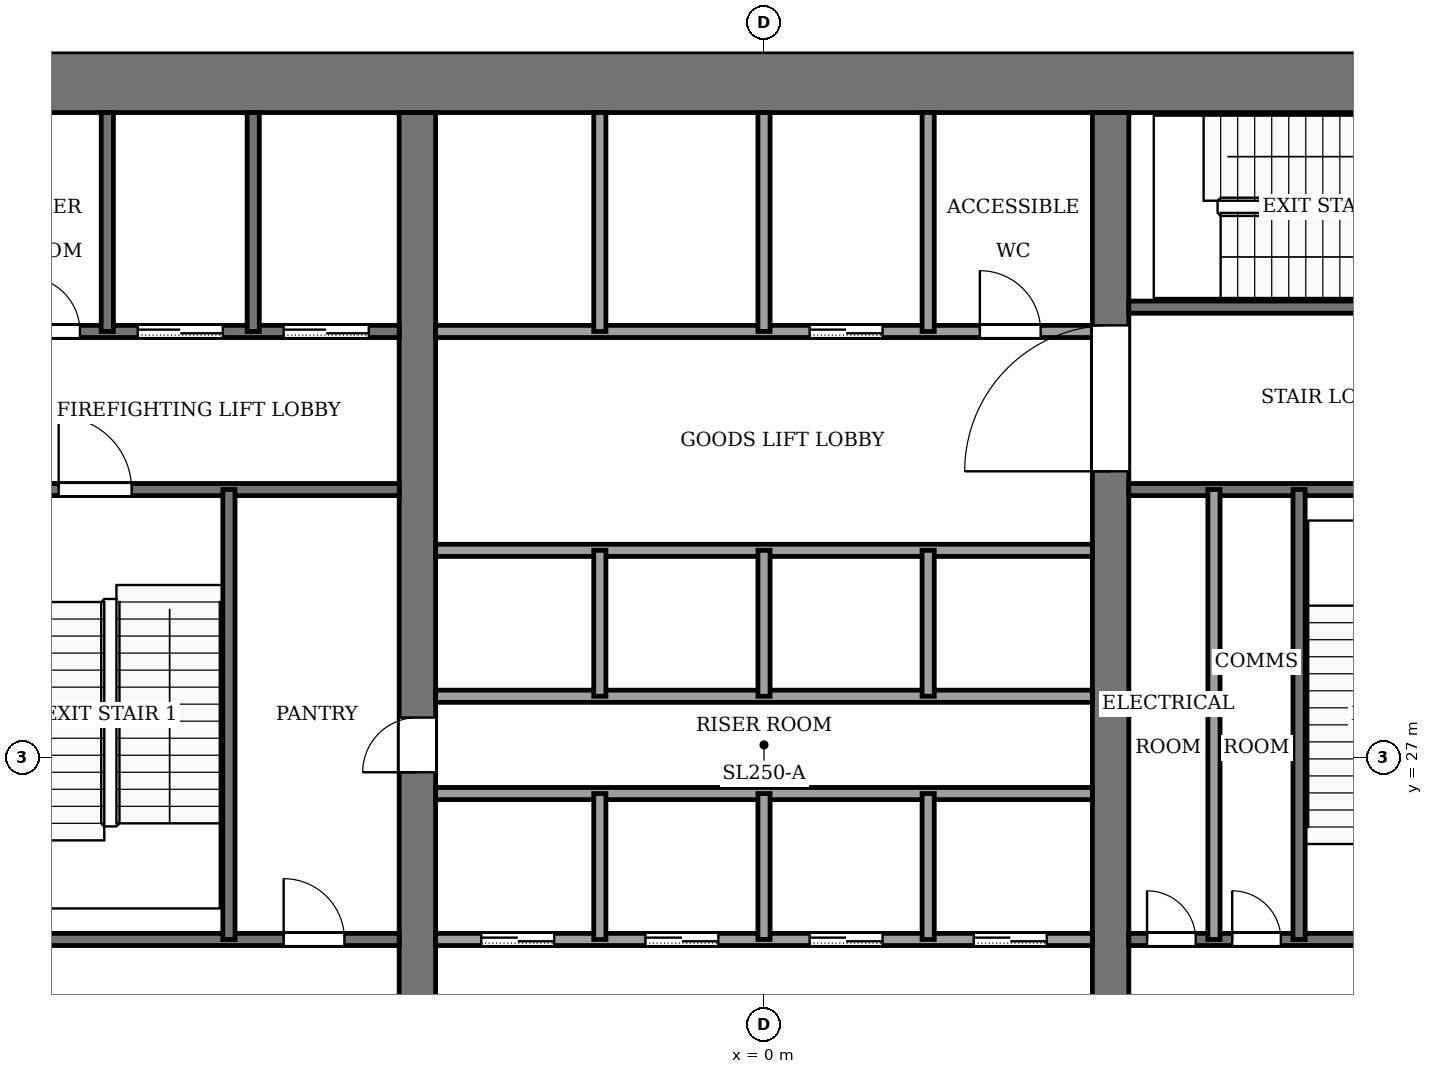
"""IFC4 building model, lengths in metres.
Left out: names, types, materials, properties, quantities, classifications, styles, units other than length and angle.
Written with IfcOpenShell. Run it as: python <this file> out.ifc"""

import sys

from ifc_helpers import new_model, si_unit, direction, frame, frame_2d, origin, place, context, subcontext, project, spatial, rectangle, extrude, element, fill, save


model = new_model("IFC4")
c1 = context("Model", 3, precision=1e-05, world=origin(), true_north=direction((0.0, 1.0)))
c2 = subcontext(c1, "Body", "Model", "MODEL_VIEW")
j1 = project(units=[si_unit("LENGTHUNIT", "METRE"), si_unit("PLANEANGLEUNIT", "RADIAN")], contexts=[c1])
p1 = place(None, origin())
s1 = spatial("IfcSite", under=j1, at=p1, CompositionType="ELEMENT")
p2 = place(p1, origin())
s2 = spatial("IfcBuilding", under=s1, at=p2, CompositionType="ELEMENT")
p3 = place(p2, frame((0.0, 0.0, 121.0)))
s3 = spatial("IfcBuildingStorey", under=s2, at=p3, CompositionType="ELEMENT", Elevation=121.0)
p4 = place(p3, frame((-13.6, 38.1, -0.13), z_axis=(0.0, 0.0, 1.0), x_axis=(1.0, 0.0, 0.0)))
e1 = element("IfcWall", 1, at=p4, inside=s3, PredefinedType="SHEAR", context=c2, shape_type="SweptSolid", body=[
    extrude(rectangle(XDim=27.2, YDim=1.0, at=frame_2d((13.6, 0.0))), origin(), (0.0, 0.0, 1.0), 5.0),
])
p5 = place(p3, frame((-5.7, 18.4, -0.13), z_axis=(0.0, 0.0, 1.0), x_axis=(0.0, 1.0, 0.0)))
e2 = element("IfcWall", 2, at=p5, inside=s3, PredefinedType="SHEAR", context=c2, shape_type="SweptSolid", body=[
    extrude(rectangle(XDim=19.2, YDim=0.6, at=frame_2d((9.6, 0.0))), origin(), (0.0, 0.0, 1.0), 5.0),
])
p6 = place(p5, frame((8.35, 0.0, 0.13)))
e3 = element("IfcOpeningElement", 3, at=p6, cuts=e2, PredefinedType="OPENING", context=c2, shape_type="SweptSolid", body=[
    extrude(rectangle(XDim=0.9, YDim=2.1, at=frame_2d((0.45, 1.05))), frame((0.0, 0.31, 0.0), z_axis=(0.0, -1.0, 0.0), x_axis=(1.0, 0.0, 0.0)), (0.0, 0.0, 1.0), 0.62),
])
p7 = place(p3, frame((5.7, 18.4, -0.13), z_axis=(0.0, 0.0, 1.0), x_axis=(0.0, 1.0, 0.0)))
e4 = element("IfcWall", 4, at=p7, inside=s3, PredefinedType="SHEAR", context=c2, shape_type="SweptSolid", body=[
    extrude(rectangle(XDim=19.2, YDim=0.6, at=frame_2d((9.6, 0.0))), origin(), (0.0, 0.0, 1.0), 5.0),
])
p8 = place(p7, frame((13.3, 0.0, 0.13)))
e5 = element("IfcOpeningElement", 5, at=p8, cuts=e4, PredefinedType="OPENING", context=c2, shape_type="SweptSolid", body=[
    extrude(rectangle(XDim=2.4, YDim=2.4, at=frame_2d((1.2, 1.2))), frame((0.0, 0.31, 0.0), z_axis=(0.0, -1.0, 0.0), x_axis=(1.0, 0.0, 0.0)), (0.0, 0.0, 1.0), 0.62),
])
p9 = place(p3, frame((-12.6, 24.0, 0.0), z_axis=(0.0, 0.0, 1.0), x_axis=(1.0, 0.0, 0.0)))
e6 = element("IfcWall", 6, at=p9, inside=s3, PredefinedType="PARTITIONING", context=c2, shape_type="SweptSolid", body=[
    extrude(rectangle(XDim=6.6, YDim=0.2, at=frame_2d((3.3, 0.0))), origin(), (0.0, 0.0, 1.0), 4.87),
])
p10 = place(p9, frame((4.7, 0.0, 0.0)))
e7 = element("IfcOpeningElement", 7, at=p10, cuts=e6, PredefinedType="OPENING", context=c2, shape_type="SweptSolid", body=[
    extrude(rectangle(XDim=1.0, YDim=2.1, at=frame_2d((0.5, 1.05))), frame((0.0, 0.11, 0.0), z_axis=(0.0, -1.0, 0.0), x_axis=(1.0, 0.0, 0.0)), (0.0, 0.0, 1.0), 0.22),
])
p11 = place(p3, frame((-5.4, 24.0, 0.0), z_axis=(0.0, 0.0, 1.0), x_axis=(1.0, 0.0, 0.0)))
e8 = element("IfcWall", 8, at=p11, inside=s3, PredefinedType="PARTITIONING", context=c2, shape_type="SweptSolid", body=[
    extrude(rectangle(XDim=10.8, YDim=0.2, at=frame_2d((5.4, 0.0))), origin(), (0.0, 0.0, 1.0), 4.87),
])
p12 = place(p11, frame((0.75, 0.0, 0.0)))
e9 = element("IfcOpeningElement", 9, at=p12, cuts=e8, PredefinedType="OPENING", context=c2, shape_type="SweptSolid", body=[
    extrude(rectangle(XDim=1.2, YDim=2.2, at=frame_2d((0.6, 1.1))), frame((0.0, 0.11, 0.0), z_axis=(0.0, -1.0, 0.0), x_axis=(1.0, 0.0, 0.0)), (0.0, 0.0, 1.0), 0.22),
])
p13 = place(p11, frame((3.45, 0.0, 0.0)))
e10 = element("IfcOpeningElement", 10, at=p13, cuts=e8, PredefinedType="OPENING", context=c2, shape_type="SweptSolid", body=[
    extrude(rectangle(XDim=1.2, YDim=2.2, at=frame_2d((0.6, 1.1))), frame((0.0, 0.11, 0.0), z_axis=(0.0, -1.0, 0.0), x_axis=(1.0, 0.0, 0.0)), (0.0, 0.0, 1.0), 0.22),
])
p14 = place(p11, frame((6.15, 0.0, 0.0)))
e11 = element("IfcOpeningElement", 11, at=p14, cuts=e8, PredefinedType="OPENING", context=c2, shape_type="SweptSolid", body=[
    extrude(rectangle(XDim=1.2, YDim=2.2, at=frame_2d((0.6, 1.1))), frame((0.0, 0.11, 0.0), z_axis=(0.0, -1.0, 0.0), x_axis=(1.0, 0.0, 0.0)), (0.0, 0.0, 1.0), 0.22),
])
p15 = place(p11, frame((8.85, 0.0, 0.0)))
e12 = element("IfcOpeningElement", 12, at=p15, cuts=e8, PredefinedType="OPENING", context=c2, shape_type="SweptSolid", body=[
    extrude(rectangle(XDim=1.2, YDim=2.2, at=frame_2d((0.6, 1.1))), frame((0.0, 0.11, 0.0), z_axis=(0.0, -1.0, 0.0), x_axis=(1.0, 0.0, 0.0)), (0.0, 0.0, 1.0), 0.22),
])
p16 = place(p3, frame((6.0, 24.0, 0.0), z_axis=(0.0, 0.0, 1.0), x_axis=(1.0, 0.0, 0.0)))
e13 = element("IfcWall", 13, at=p16, inside=s3, PredefinedType="PARTITIONING", context=c2, shape_type="SweptSolid", body=[
    extrude(rectangle(XDim=6.6, YDim=0.2, at=frame_2d((3.3, 0.0))), origin(), (0.0, 0.0, 1.0), 4.87),
])
p17 = place(p16, frame((0.3, 0.0, 0.0)))
e14 = element("IfcOpeningElement", 14, at=p17, cuts=e13, PredefinedType="OPENING", context=c2, shape_type="SweptSolid", body=[
    extrude(rectangle(XDim=0.8, YDim=2.1, at=frame_2d((0.4, 1.05))), frame((0.0, 0.11, 0.0), z_axis=(0.0, -1.0, 0.0), x_axis=(1.0, 0.0, 0.0)), (0.0, 0.0, 1.0), 0.22),
])
p18 = place(p16, frame((1.7, 0.0, 0.0)))
e15 = element("IfcOpeningElement", 15, at=p18, cuts=e13, PredefinedType="OPENING", context=c2, shape_type="SweptSolid", body=[
    extrude(rectangle(XDim=0.8, YDim=2.1, at=frame_2d((0.4, 1.05))), frame((0.0, 0.11, 0.0), z_axis=(0.0, -1.0, 0.0), x_axis=(1.0, 0.0, 0.0)), (0.0, 0.0, 1.0), 0.22),
])
p19 = place(p16, frame((4.4, 0.0, 0.0)))
e16 = element("IfcOpeningElement", 16, at=p19, cuts=e13, PredefinedType="OPENING", context=c2, shape_type="SweptSolid", body=[
    extrude(rectangle(XDim=1.2, YDim=2.2, at=frame_2d((0.6, 1.1))), frame((0.0, 0.11, 0.0), z_axis=(0.0, -1.0, 0.0), x_axis=(1.0, 0.0, 0.0)), (0.0, 0.0, 1.0), 0.22),
])
for number, where, z_axis, x_axis in (
    (17, (-5.4, 26.4, 0.0), (0.0, 0.0, 1.0), (1.0, 0.0, 0.0)),
    (18, (-5.4, 28.0, 0.0), (0.0, 0.0, 1.0), (1.0, 0.0, 0.0)),
    (19, (-5.4, 30.4, 0.0), (0.0, 0.0, 1.0), (1.0, 0.0, 0.0)),
):
    element("IfcWall", number, at=place(p3, frame(where, z_axis=z_axis, x_axis=x_axis)), inside=s3, PredefinedType="PARTITIONING", context=c2, shape_type="SweptSolid", body=[
        extrude(rectangle(XDim=10.8, YDim=0.2, at=frame_2d((5.4, 0.0))), origin(), (0.0, 0.0, 1.0), 4.87),
    ])
p20 = place(p3, frame((-12.6, 31.4, 0.0), z_axis=(0.0, 0.0, 1.0), x_axis=(1.0, 0.0, 0.0)))
e20 = element("IfcWall", 20, at=p20, inside=s3, PredefinedType="PARTITIONING", context=c2, shape_type="SweptSolid", body=[
    extrude(rectangle(XDim=6.6, YDim=0.2, at=frame_2d((3.3, 0.0))), origin(), (0.0, 0.0, 1.0), 4.87),
])
p21 = place(p20, frame((1.0, 0.0, 0.0)))
e21 = element("IfcOpeningElement", 21, at=p21, cuts=e20, PredefinedType="OPENING", context=c2, shape_type="SweptSolid", body=[
    extrude(rectangle(XDim=1.2, YDim=2.2, at=frame_2d((0.6, 1.1))), frame((0.0, 0.11, 0.0), z_axis=(0.0, -1.0, 0.0), x_axis=(1.0, 0.0, 0.0)), (0.0, 0.0, 1.0), 0.22),
])
p22 = place(p3, frame((6.0, 31.4, 0.0), z_axis=(0.0, 0.0, 1.0), x_axis=(1.0, 0.0, 0.0)))
e22 = element("IfcWall", 22, at=p22, inside=s3, PredefinedType="PARTITIONING", context=c2, shape_type="SweptSolid", body=[
    extrude(rectangle(XDim=6.6, YDim=0.2, at=frame_2d((3.3, 0.0))), origin(), (0.0, 0.0, 1.0), 4.87),
])
p23 = place(p3, frame((-12.6, 34.0, 0.0), z_axis=(0.0, 0.0, 1.0), x_axis=(1.0, 0.0, 0.0)))
e23 = element("IfcWall", 23, at=p23, inside=s3, PredefinedType="PARTITIONING", context=c2, shape_type="SweptSolid", body=[
    extrude(rectangle(XDim=6.6, YDim=0.2, at=frame_2d((3.3, 0.0))), origin(), (0.0, 0.0, 1.0), 4.87),
])
p24 = place(p23, frame((4.7, 0.0, 0.0)))
e24 = element("IfcOpeningElement", 24, at=p24, cuts=e23, PredefinedType="OPENING", context=c2, shape_type="SweptSolid", body=[
    extrude(rectangle(XDim=1.4, YDim=2.2, at=frame_2d((0.7, 1.1))), frame((0.0, 0.11, 0.0), z_axis=(0.0, -1.0, 0.0), x_axis=(1.0, 0.0, 0.0)), (0.0, 0.0, 1.0), 0.22),
])
p25 = place(p23, frame((2.3, 0.0, 0.0)))
e25 = element("IfcOpeningElement", 25, at=p25, cuts=e23, PredefinedType="OPENING", context=c2, shape_type="SweptSolid", body=[
    extrude(rectangle(XDim=1.4, YDim=2.2, at=frame_2d((0.7, 1.1))), frame((0.0, 0.11, 0.0), z_axis=(0.0, -1.0, 0.0), x_axis=(1.0, 0.0, 0.0)), (0.0, 0.0, 1.0), 0.22),
])
p26 = place(p23, frame((0.45, 0.0, 0.0)))
e26 = element("IfcOpeningElement", 26, at=p26, cuts=e23, PredefinedType="OPENING", context=c2, shape_type="SweptSolid", body=[
    extrude(rectangle(XDim=0.9, YDim=2.1, at=frame_2d((0.45, 1.05))), frame((0.0, 0.11, 0.0), z_axis=(0.0, -1.0, 0.0), x_axis=(1.0, 0.0, 0.0)), (0.0, 0.0, 1.0), 0.22),
])
p27 = place(p3, frame((-5.4, 34.0, 0.0), z_axis=(0.0, 0.0, 1.0), x_axis=(1.0, 0.0, 0.0)))
e27 = element("IfcWall", 27, at=p27, inside=s3, PredefinedType="PARTITIONING", context=c2, shape_type="SweptSolid", body=[
    extrude(rectangle(XDim=10.8, YDim=0.2, at=frame_2d((5.4, 0.0))), origin(), (0.0, 0.0, 1.0), 4.87),
])
p28 = place(p27, frame((6.15, 0.0, 0.0)))
e28 = element("IfcOpeningElement", 28, at=p28, cuts=e27, PredefinedType="OPENING", context=c2, shape_type="SweptSolid", body=[
    extrude(rectangle(XDim=1.2, YDim=2.2, at=frame_2d((0.6, 1.1))), frame((0.0, 0.11, 0.0), z_axis=(0.0, -1.0, 0.0), x_axis=(1.0, 0.0, 0.0)), (0.0, 0.0, 1.0), 0.22),
])
p29 = place(p27, frame((8.95, 0.0, 0.0)))
e29 = element("IfcOpeningElement", 29, at=p29, cuts=e27, PredefinedType="OPENING", context=c2, shape_type="SweptSolid", body=[
    extrude(rectangle(XDim=1.0, YDim=2.1, at=frame_2d((0.5, 1.05))), frame((0.0, 0.11, 0.0), z_axis=(0.0, -1.0, 0.0), x_axis=(1.0, 0.0, 0.0)), (0.0, 0.0, 1.0), 0.22),
])
p30 = place(p3, frame((6.0, 34.4, 0.0), z_axis=(0.0, 0.0, 1.0), x_axis=(1.0, 0.0, 0.0)))
e30 = element("IfcWall", 30, at=p30, inside=s3, PredefinedType="PARTITIONING", context=c2, shape_type="SweptSolid", body=[
    extrude(rectangle(XDim=6.6, YDim=0.2, at=frame_2d((3.3, 0.0))), origin(), (0.0, 0.0, 1.0), 4.87),
])
p31 = place(p30, frame((4.8, 0.0, 0.0)))
e31 = element("IfcOpeningElement", 31, at=p31, cuts=e30, PredefinedType="OPENING", context=c2, shape_type="SweptSolid", body=[
    extrude(rectangle(XDim=1.2, YDim=2.2, at=frame_2d((0.6, 1.1))), frame((0.0, 0.11, 0.0), z_axis=(0.0, -1.0, 0.0), x_axis=(1.0, 0.0, 0.0)), (0.0, 0.0, 1.0), 0.22),
])
p32 = place(p3, frame((-10.8, 34.0, 0.0), z_axis=(0.0, 0.0, 1.0), x_axis=(0.0, 1.0, 0.0)))
e32 = element("IfcWall", 32, at=p32, inside=s3, PredefinedType="PARTITIONING", context=c2, shape_type="SweptSolid", body=[
    extrude(rectangle(XDim=3.6, YDim=0.2, at=frame_2d((1.8, 0.0))), origin(), (0.0, 0.0, 1.0), 4.87),
])
p33 = place(p3, frame((-8.8, 24.0, 0.0), z_axis=(0.0, 0.0, 1.0), x_axis=(0.0, 1.0, 0.0)))
e33 = element("IfcWall", 33, at=p33, inside=s3, PredefinedType="PARTITIONING", context=c2, shape_type="SweptSolid", body=[
    extrude(rectangle(XDim=7.4, YDim=0.2, at=frame_2d((3.7, 0.0))), origin(), (0.0, 0.0, 1.0), 4.87),
])
p34 = place(p3, frame((-8.4, 34.0, 0.0), z_axis=(0.0, 0.0, 1.0), x_axis=(0.0, 1.0, 0.0)))
e34 = element("IfcWall", 34, at=p34, inside=s3, PredefinedType="PARTITIONING", context=c2, shape_type="SweptSolid", body=[
    extrude(rectangle(XDim=3.6, YDim=0.2, at=frame_2d((1.8, 0.0))), origin(), (0.0, 0.0, 1.0), 4.87),
])
for number, where, z_axis, x_axis in (
    (35, (-2.7, 24.0, 0.0), (0.0, 0.0, 1.0), (0.0, 1.0, 0.0)),
    (36, (-2.7, 28.0, 0.0), (0.0, 0.0, 1.0), (0.0, 1.0, 0.0)),
):
    element("IfcWall", number, at=place(p3, frame(where, z_axis=z_axis, x_axis=x_axis)), inside=s3, PredefinedType="PARTITIONING", context=c2, shape_type="SweptSolid", body=[
        extrude(rectangle(XDim=2.4, YDim=0.2, at=frame_2d((1.2, 0.0))), origin(), (0.0, 0.0, 1.0), 4.87),
    ])
p35 = place(p3, frame((-2.7, 34.0, 0.0), z_axis=(0.0, 0.0, 1.0), x_axis=(0.0, 1.0, 0.0)))
e37 = element("IfcWall", 37, at=p35, inside=s3, PredefinedType="PARTITIONING", context=c2, shape_type="SweptSolid", body=[
    extrude(rectangle(XDim=3.6, YDim=0.2, at=frame_2d((1.8, 0.0))), origin(), (0.0, 0.0, 1.0), 4.87),
])
for number, where, z_axis, x_axis in (
    (38, (0.0, 24.0, 0.0), (0.0, 0.0, 1.0), (0.0, 1.0, 0.0)),
    (39, (0.0, 28.0, 0.0), (0.0, 0.0, 1.0), (0.0, 1.0, 0.0)),
):
    element("IfcWall", number, at=place(p3, frame(where, z_axis=z_axis, x_axis=x_axis)), inside=s3, PredefinedType="PARTITIONING", context=c2, shape_type="SweptSolid", body=[
        extrude(rectangle(XDim=2.4, YDim=0.2, at=frame_2d((1.2, 0.0))), origin(), (0.0, 0.0, 1.0), 4.87),
    ])
p36 = place(p3, frame((0.0, 34.0, 0.0), z_axis=(0.0, 0.0, 1.0), x_axis=(0.0, 1.0, 0.0)))
e40 = element("IfcWall", 40, at=p36, inside=s3, PredefinedType="PARTITIONING", context=c2, shape_type="SweptSolid", body=[
    extrude(rectangle(XDim=3.6, YDim=0.2, at=frame_2d((1.8, 0.0))), origin(), (0.0, 0.0, 1.0), 4.87),
])
for number, where, z_axis, x_axis in (
    (41, (2.7, 24.0, 0.0), (0.0, 0.0, 1.0), (0.0, 1.0, 0.0)),
    (42, (2.7, 28.0, 0.0), (0.0, 0.0, 1.0), (0.0, 1.0, 0.0)),
):
    element("IfcWall", number, at=place(p3, frame(where, z_axis=z_axis, x_axis=x_axis)), inside=s3, PredefinedType="PARTITIONING", context=c2, shape_type="SweptSolid", body=[
        extrude(rectangle(XDim=2.4, YDim=0.2, at=frame_2d((1.2, 0.0))), origin(), (0.0, 0.0, 1.0), 4.87),
    ])
p37 = place(p3, frame((2.7, 34.0, 0.0), z_axis=(0.0, 0.0, 1.0), x_axis=(0.0, 1.0, 0.0)))
e43 = element("IfcWall", 43, at=p37, inside=s3, PredefinedType="PARTITIONING", context=c2, shape_type="SweptSolid", body=[
    extrude(rectangle(XDim=3.6, YDim=0.2, at=frame_2d((1.8, 0.0))), origin(), (0.0, 0.0, 1.0), 4.87),
])
for number, where, z_axis, x_axis in (
    (44, (7.4, 24.0, 0.0), (0.0, 0.0, 1.0), (0.0, 1.0, 0.0)),
    (45, (8.8, 24.0, 0.0), (0.0, 0.0, 1.0), (0.0, 1.0, 0.0)),
):
    element("IfcWall", number, at=place(p3, frame(where, z_axis=z_axis, x_axis=x_axis)), inside=s3, PredefinedType="PARTITIONING", context=c2, shape_type="SweptSolid", body=[
        extrude(rectangle(XDim=7.4, YDim=0.2, at=frame_2d((3.7, 0.0))), origin(), (0.0, 0.0, 1.0), 4.87),
    ])
p38 = place(p12, origin())
e46 = element("IfcDoor", 46, at=p38, inside=s3, OperationType="SLIDING_TO_LEFT", PredefinedType="DOOR", context=c2, shape_type="SweptSolid", body=[
    extrude(rectangle(XDim=1.2, YDim=2.2, at=frame_2d((0.6, 1.1))), frame((0.0, 0.025, 0.0), z_axis=(0.0, -1.0, 0.0), x_axis=(1.0, 0.0, 0.0)), (0.0, 0.0, 1.0), 0.05),
])
fill(e9, e46)
p39 = place(p13, origin())
e47 = element("IfcDoor", 47, at=p39, inside=s3, OperationType="SLIDING_TO_LEFT", PredefinedType="DOOR", context=c2, shape_type="SweptSolid", body=[
    extrude(rectangle(XDim=1.2, YDim=2.2, at=frame_2d((0.6, 1.1))), frame((0.0, 0.025, 0.0), z_axis=(0.0, -1.0, 0.0), x_axis=(1.0, 0.0, 0.0)), (0.0, 0.0, 1.0), 0.05),
])
fill(e10, e47)
p40 = place(p14, origin())
e48 = element("IfcDoor", 48, at=p40, inside=s3, OperationType="SLIDING_TO_LEFT", PredefinedType="DOOR", context=c2, shape_type="SweptSolid", body=[
    extrude(rectangle(XDim=1.2, YDim=2.2, at=frame_2d((0.6, 1.1))), frame((0.0, 0.025, 0.0), z_axis=(0.0, -1.0, 0.0), x_axis=(1.0, 0.0, 0.0)), (0.0, 0.0, 1.0), 0.05),
])
fill(e11, e48)
p41 = place(p15, origin())
e49 = element("IfcDoor", 49, at=p41, inside=s3, OperationType="SLIDING_TO_LEFT", PredefinedType="DOOR", context=c2, shape_type="SweptSolid", body=[
    extrude(rectangle(XDim=1.2, YDim=2.2, at=frame_2d((0.6, 1.1))), frame((0.0, 0.025, 0.0), z_axis=(0.0, -1.0, 0.0), x_axis=(1.0, 0.0, 0.0)), (0.0, 0.0, 1.0), 0.05),
])
fill(e12, e49)
p42 = place(p28, origin())
e50 = element("IfcDoor", 50, at=p42, inside=s3, OperationType="SLIDING_TO_LEFT", PredefinedType="DOOR", context=c2, shape_type="SweptSolid", body=[
    extrude(rectangle(XDim=1.2, YDim=2.2, at=frame_2d((0.6, 1.1))), frame((0.0, 0.025, 0.0), z_axis=(0.0, -1.0, 0.0), x_axis=(1.0, 0.0, 0.0)), (0.0, 0.0, 1.0), 0.05),
])
fill(e28, e50)
p43 = place(p24, origin())
e51 = element("IfcDoor", 51, at=p43, inside=s3, OperationType="SLIDING_TO_LEFT", PredefinedType="DOOR", context=c2, shape_type="SweptSolid", body=[
    extrude(rectangle(XDim=1.4, YDim=2.2, at=frame_2d((0.7, 1.1))), frame((0.0, 0.025, 0.0), z_axis=(0.0, -1.0, 0.0), x_axis=(1.0, 0.0, 0.0)), (0.0, 0.0, 1.0), 0.05),
])
fill(e24, e51)
p44 = place(p25, origin())
e52 = element("IfcDoor", 52, at=p44, inside=s3, OperationType="SLIDING_TO_LEFT", PredefinedType="DOOR", context=c2, shape_type="SweptSolid", body=[
    extrude(rectangle(XDim=1.4, YDim=2.2, at=frame_2d((0.7, 1.1))), frame((0.0, 0.025, 0.0), z_axis=(0.0, -1.0, 0.0), x_axis=(1.0, 0.0, 0.0)), (0.0, 0.0, 1.0), 0.05),
])
fill(e25, e52)
p45 = place(p26, origin())
e53 = element("IfcDoor", 53, at=p45, inside=s3, OperationType="SINGLE_SWING_RIGHT", PredefinedType="DOOR", context=c2, shape_type="SweptSolid", body=[
    extrude(rectangle(XDim=0.9, YDim=2.1, at=frame_2d((0.45, 1.05))), frame((0.0, 0.025, 0.0), z_axis=(0.0, -1.0, 0.0), x_axis=(1.0, 0.0, 0.0)), (0.0, 0.0, 1.0), 0.05),
])
fill(e26, e53)
p46 = place(p10, origin())
e54 = element("IfcDoor", 54, at=p46, inside=s3, OperationType="SINGLE_SWING_LEFT", PredefinedType="DOOR", context=c2, shape_type="SweptSolid", body=[
    extrude(rectangle(XDim=1.0, YDim=2.1, at=frame_2d((0.5, 1.05))), frame((0.0, 0.025, 0.0), z_axis=(0.0, -1.0, 0.0), x_axis=(1.0, 0.0, 0.0)), (0.0, 0.0, 1.0), 0.05),
])
fill(e7, e54)
p47 = place(p17, origin())
e55 = element("IfcDoor", 55, at=p47, inside=s3, OperationType="SINGLE_SWING_LEFT", PredefinedType="DOOR", context=c2, shape_type="SweptSolid", body=[
    extrude(rectangle(XDim=0.8, YDim=2.1, at=frame_2d((0.4, 1.05))), frame((0.0, 0.025, 0.0), z_axis=(0.0, -1.0, 0.0), x_axis=(1.0, 0.0, 0.0)), (0.0, 0.0, 1.0), 0.05),
])
fill(e14, e55)
p48 = place(p18, origin())
e56 = element("IfcDoor", 56, at=p48, inside=s3, OperationType="SINGLE_SWING_RIGHT", PredefinedType="DOOR", context=c2, shape_type="SweptSolid", body=[
    extrude(rectangle(XDim=0.8, YDim=2.1, at=frame_2d((0.4, 1.05))), frame((0.0, 0.025, 0.0), z_axis=(0.0, -1.0, 0.0), x_axis=(1.0, 0.0, 0.0)), (0.0, 0.0, 1.0), 0.05),
])
fill(e15, e56)
p49 = place(p29, origin())
e57 = element("IfcDoor", 57, at=p49, inside=s3, OperationType="SINGLE_SWING_LEFT", PredefinedType="DOOR", context=c2, shape_type="SweptSolid", body=[
    extrude(rectangle(XDim=1.0, YDim=2.1, at=frame_2d((0.5, 1.05))), frame((0.0, 0.025, 0.0), z_axis=(0.0, -1.0, 0.0), x_axis=(1.0, 0.0, 0.0)), (0.0, 0.0, 1.0), 0.05),
])
fill(e29, e57)
p50 = place(p6, origin())
e58 = element("IfcDoor", 58, at=p50, inside=s3, OperationType="SINGLE_SWING_RIGHT", PredefinedType="DOOR", context=c2, shape_type="SweptSolid", body=[
    extrude(rectangle(XDim=0.9, YDim=2.1, at=frame_2d((0.45, 1.05))), frame((0.0, 0.025, 0.0), z_axis=(0.0, -1.0, 0.0), x_axis=(1.0, 0.0, 0.0)), (0.0, 0.0, 1.0), 0.05),
])
fill(e3, e58)
p51 = place(p21, origin())
e59 = element("IfcDoor", 59, at=p51, inside=s3, OperationType="SINGLE_SWING_RIGHT", PredefinedType="DOOR", context=c2, shape_type="SweptSolid", body=[
    extrude(rectangle(XDim=1.2, YDim=2.2, at=frame_2d((0.6, 1.1))), frame((0.0, 0.025, 0.0), z_axis=(0.0, -1.0, 0.0), x_axis=(1.0, 0.0, 0.0)), (0.0, 0.0, 1.0), 0.05),
])
fill(e21, e59)
p52 = place(p8, origin())
e60 = element("IfcDoor", 60, at=p52, inside=s3, OperationType="DOUBLE_DOOR_SINGLE_SWING", PredefinedType="DOOR", context=c2, shape_type="SweptSolid", body=[
    extrude(rectangle(XDim=2.4, YDim=2.4, at=frame_2d((1.2, 1.2))), frame((0.0, 0.025, 0.0), z_axis=(0.0, -1.0, 0.0), x_axis=(1.0, 0.0, 0.0)), (0.0, 0.0, 1.0), 0.05),
])
fill(e5, e60)
save(model, sys.argv[1])
